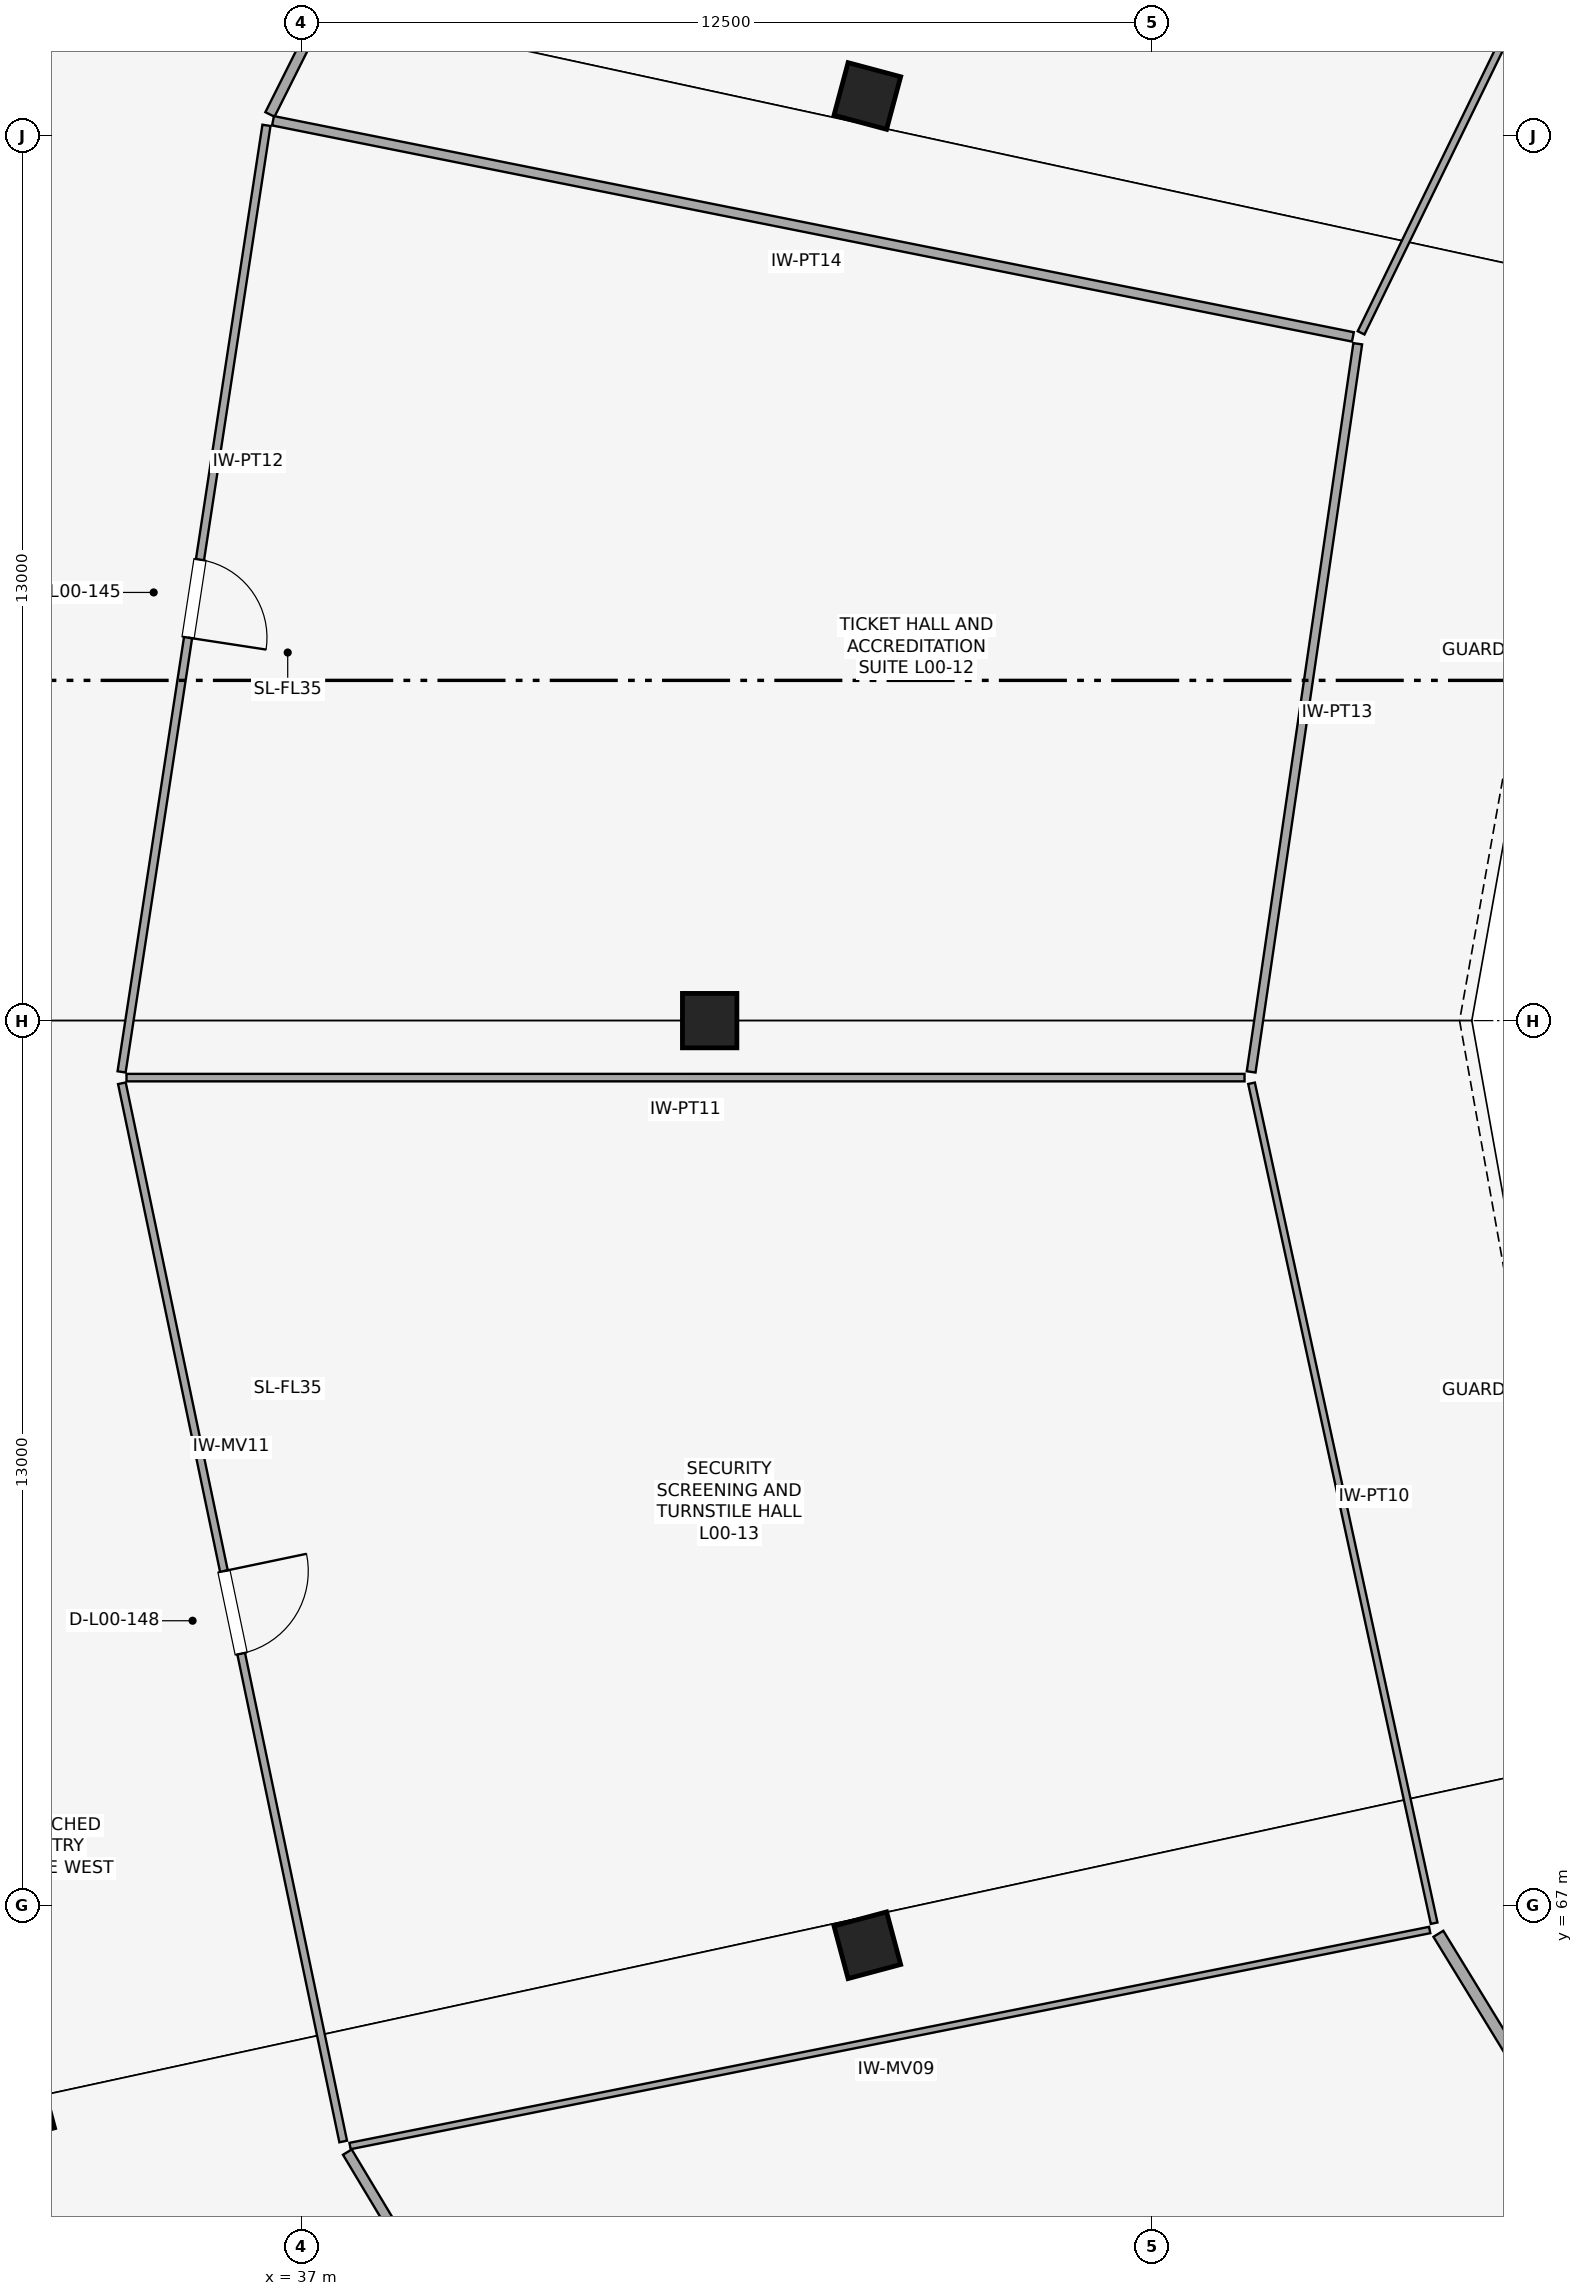
"""IFC4 building model, lengths in metres.
Left out: names, types, materials, properties, quantities, classifications, styles, units other than length and angle.
Written with IfcOpenShell. Run it as: python <this file> out.ifc"""

import sys

from ifc_helpers import new_model, si_unit, direction, frame, frame_2d, origin, origin_2d, place, context, subcontext, project, spatial, rectangle, extrude, element, fill, save


model = new_model("IFC4")
c1 = context("Model", 3, precision=1e-05, world=origin(), true_north=direction((0.0, 1.0)))
c2 = subcontext(c1, "Body", "Model", "MODEL_VIEW")
j1 = project(units=[si_unit("LENGTHUNIT", "METRE"), si_unit("PLANEANGLEUNIT", "RADIAN")], contexts=[c1])
p1 = place(None, origin())
s1 = spatial("IfcSite", under=j1, at=p1, CompositionType="ELEMENT")
p2 = place(p1, origin())
s2 = spatial("IfcBuilding", under=s1, at=p2, CompositionType="ELEMENT")
p3 = place(p2, origin())
s3 = spatial("IfcBuildingStorey", under=s2, at=p3, CompositionType="ELEMENT", Elevation=0.0)
for number, where, z_axis, x_axis in (
    (1, (45.317, 93.588, 0.0), (0.0, 0.0, 1.0), (-0.966, 0.259, 0.0)),
    (2, (43.0, 80.0, 0.0), (0.0, 0.0, 1.0), (-1.0, 0.0, 0.0)),
    (3, (45.317, 66.412, 0.0), (0.0, 0.0, 1.0), (-0.966, -0.259, 0.0)),
):
    element("IfcColumn", number, at=place(p3, frame(where, z_axis=z_axis, x_axis=x_axis)), inside=s3, PredefinedType="COLUMN", context=c2, shape_type="SweptSolid", body=[
        extrude(rectangle(XDim=0.8, YDim=0.8, at=origin_2d()), origin(), (0.0, 0.0, 1.0), 5.4),
    ])
p4 = place(p3, frame((32.76, 64.083, 0.0), z_axis=(0.0, 0.0, 1.0), x_axis=(-0.965925826289, -0.258819045103, 0.0)))
e4 = element("IfcColumn", 4, at=p4, inside=s3, PredefinedType="COLUMN", context=c2, shape_type="SweptSolid", body=[
    extrude(rectangle(XDim=1.0, YDim=1.0, at=origin_2d()), origin(), (0.0, 0.0, 1.0), 5.4),
])
p5 = place(p3, frame((58.278, 101.814, 0.0), z_axis=(0.0, 0.0, 1.0), x_axis=(-0.438109276783, -0.898921721618, 0.0)))
e5 = element("IfcWall", 5, at=p5, inside=s3, PredefinedType="PARTITIONING", context=c2, shape_type="SweptSolid", body=[
    extrude(rectangle(XDim=13.023, YDim=0.11, at=frame_2d((6.511, 0.0))), origin(), (0.0, 0.0, 1.0), 3.69),
])
p6 = place(p3, frame((38.705, 97.643, 0.0), z_axis=(0.0, 0.0, 1.0), x_axis=(-0.447798791691, -0.894134353528, 0.0)))
e6 = element("IfcWall", 6, at=p6, inside=s3, PredefinedType="PARTITIONING", context=c2, shape_type="SweptSolid", body=[
    extrude(rectangle(XDim=4.839, YDim=0.15, at=frame_2d((2.419, 0.0))), origin(), (0.0, 0.0, 1.0), 3.69),
])
p7 = place(p6, frame((1.1, 0.0, 0.0)))
e7 = element("IfcOpeningElement", 7, at=p7, cuts=e6, PredefinedType="OPENING", context=c2, shape_type="SweptSolid", body=[
    extrude(rectangle(XDim=1.02, YDim=2.24, at=frame_2d((0.51, 1.12))), frame((0.0, 0.085, 0.0), z_axis=(0.0, -1.0, 0.0), x_axis=(1.0, 0.0, 0.0)), (0.0, 0.0, 1.0), 0.17),
])
p8 = place(p3, frame((52.452, 90.048, 0.0), z_axis=(0.0, 0.0, 1.0), x_axis=(-0.980551073479, 0.196264088155, 0.0)))
e8 = element("IfcWall", 8, at=p8, inside=s3, PredefinedType="PARTITIONING", context=c2, shape_type="SweptSolid", body=[
    extrude(rectangle(XDim=16.184, YDim=0.14, at=frame_2d((8.092, 0.0))), origin(), (0.0, 0.0, 1.0), 3.69),
])
p9 = place(p3, frame((52.523, 89.947, 0.0), z_axis=(0.0, 0.0, 1.0), x_axis=(-0.144821282161, -0.989457829437, 0.0)))
e9 = element("IfcWall", 9, at=p9, inside=s3, PredefinedType="PARTITIONING", context=c2, shape_type="SweptSolid", body=[
    extrude(rectangle(XDim=10.814, YDim=0.13, at=frame_2d((5.407, 0.0))), origin(), (0.0, 0.0, 1.0), 3.69),
])
p10 = place(p3, frame((36.487, 93.156, 0.0), z_axis=(0.0, 0.0, 1.0), x_axis=(-0.151287942075, -0.988489736205, 0.0)))
e10 = element("IfcWall", 10, at=p10, inside=s3, PredefinedType="PARTITIONING", context=c2, shape_type="SweptSolid", body=[
    extrude(rectangle(XDim=14.072, YDim=0.12, at=frame_2d((7.036, 0.0))), origin(), (0.0, 0.0, 1.0), 3.69),
])
p11 = place(p10, frame((6.456, 0.0, 0.0)))
e11 = element("IfcOpeningElement", 11, at=p11, cuts=e10, PredefinedType="OPENING", context=c2, shape_type="SweptSolid", body=[
    extrude(rectangle(XDim=1.16, YDim=2.1, at=frame_2d((0.58, 1.05))), frame((0.0, 0.07, 0.0), z_axis=(0.0, -1.0, 0.0), x_axis=(1.0, 0.0, 0.0)), (0.0, 0.0, 1.0), 0.14),
])
p12 = place(p3, frame((50.86, 79.162, 0.0), z_axis=(0.0, 0.0, 1.0), x_axis=(-0.99999999989, 1.4859945e-05, 0.0)))
e12 = element("IfcWall", 12, at=p12, inside=s3, PredefinedType="PARTITIONING", context=c2, shape_type="SweptSolid", body=[
    extrude(rectangle(XDim=16.429, YDim=0.11, at=frame_2d((8.215, 0.0))), origin(), (0.0, 0.0, 1.0), 3.69),
])
p13 = place(p3, frame((50.963, 79.079, 0.0), z_axis=(0.0, 0.0, 1.0), x_axis=(0.212413595867, -0.977179852581, 0.0)))
e13 = element("IfcWall", 13, at=p13, inside=s3, PredefinedType="PARTITIONING", context=c2, shape_type="SweptSolid", body=[
    extrude(rectangle(XDim=12.632, YDim=0.1, at=frame_2d((6.316, 0.0))), origin(), (0.0, 0.0, 1.0), 3.69),
])
p14 = place(p3, frame((34.363, 79.079, 0.0), z_axis=(0.0, 0.0, 1.0), x_axis=(0.204702237008, -0.978824291772, 0.0)))
e14 = element("IfcWall", 14, at=p14, inside=s3, PredefinedType="MOVABLE", context=c2, shape_type="SweptSolid", body=[
    extrude(rectangle(XDim=15.887, YDim=0.115, at=frame_2d((7.944, 0.0))), origin(), (0.0, 0.0, 1.0), 3.69),
])
p15 = place(p14, frame((7.324, 0.0, 0.0)))
e15 = element("IfcOpeningElement", 15, at=p15, cuts=e14, PredefinedType="OPENING", context=c2, shape_type="SweptSolid", body=[
    extrude(rectangle(XDim=1.24, YDim=2.24, at=frame_2d((0.62, 1.12))), frame((0.0, 0.067, 0.0), z_axis=(0.0, -1.0, 0.0), x_axis=(1.0, 0.0, 0.0)), (0.0, 0.0, 1.0), 0.135),
])
p16 = place(p3, frame((53.581, 66.636, 0.0), z_axis=(0.0, 0.0, 1.0), x_axis=(-0.980562680484, -0.196206089719, 0.0)))
e16 = element("IfcWall", 16, at=p16, inside=s3, PredefinedType="MOVABLE", context=c2, shape_type="SweptSolid", body=[
    extrude(rectangle(XDim=16.18, YDim=0.095, at=frame_2d((8.09, 0.0))), origin(), (0.0, 0.0, 1.0), 3.69),
])
p17 = place(p3, frame((53.708, 66.581, 0.0), z_axis=(0.0, 0.0, 1.0), x_axis=(0.521817408565, -0.85305720331, 0.0)))
e17 = element("IfcWall", 17, at=p17, inside=s3, PredefinedType="PARTITIONING", context=c2, shape_type="SweptSolid", body=[
    extrude(rectangle(XDim=12.927, YDim=0.17, at=frame_2d((6.464, 0.0))), origin(), (0.0, 0.0, 1.0), 3.69),
])
p18 = place(p3, frame((37.676, 63.372, 0.0), z_axis=(0.0, 0.0, 1.0), x_axis=(0.514350755829, -0.8575799088, 0.0)))
e18 = element("IfcWall", 18, at=p18, inside=s3, PredefinedType="PARTITIONING", context=c2, shape_type="SweptSolid", body=[
    extrude(rectangle(XDim=16.343, YDim=0.15, at=frame_2d((8.171, 0.0))), origin(), (0.0, 0.0, 1.0), 3.69),
])
p19 = place(p18, frame((7.662, 0.0, 0.0)))
e19 = element("IfcOpeningElement", 19, at=p19, cuts=e18, PredefinedType="OPENING", context=c2, shape_type="SweptSolid", body=[
    extrude(rectangle(XDim=1.02, YDim=2.38, at=frame_2d((0.51, 1.19))), frame((0.0, 0.085, 0.0), z_axis=(0.0, -1.0, 0.0), x_axis=(1.0, 0.0, 0.0)), (0.0, 0.0, 1.0), 0.17),
])
p20 = place(p11, origin())
e20 = element("IfcDoor", 20, at=p20, inside=s3, OperationType="SINGLE_SWING_RIGHT", PredefinedType="DOOR", context=c2, shape_type="SweptSolid", body=[
    extrude(rectangle(XDim=1.16, YDim=2.1, at=frame_2d((0.58, 1.05))), frame((0.0, 0.025, 0.0), z_axis=(0.0, -1.0, 0.0), x_axis=(1.0, 0.0, 0.0)), (0.0, 0.0, 1.0), 0.05),
])
fill(e11, e20)
p21 = place(p15, origin())
e21 = element("IfcDoor", 21, at=p21, inside=s3, OperationType="SINGLE_SWING_LEFT", PredefinedType="DOOR", context=c2, shape_type="SweptSolid", body=[
    extrude(rectangle(XDim=1.24, YDim=2.24, at=frame_2d((0.62, 1.12))), frame((0.0, 0.025, 0.0), z_axis=(0.0, -1.0, 0.0), x_axis=(1.0, 0.0, 0.0)), (0.0, 0.0, 1.0), 0.05),
])
fill(e15, e21)
save(model, sys.argv[1])
